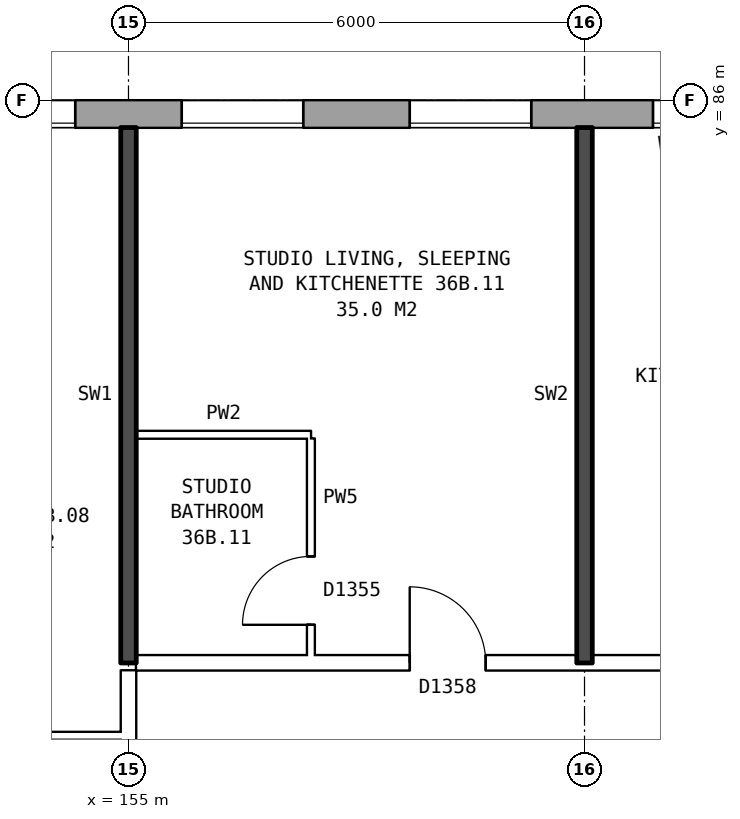
"""IFC4 building model, lengths in metres.
Left out: names, types, materials, properties, quantities, classifications, styles, units other than length and angle.
Written with IfcOpenShell. Run it as: python <this file> out.ifc"""

import sys

from ifc_helpers import new_model, si_unit, direction, frame, frame_2d, origin, place, context, subcontext, project, spatial, rectangle, extrude, element, fill, save


model = new_model("IFC4")
c1 = context("Model", 3, precision=1e-05, world=origin(), true_north=direction((0.0, 1.0)))
c2 = subcontext(c1, "Body", "Model", "MODEL_VIEW")
j1 = project(units=[si_unit("LENGTHUNIT", "METRE"), si_unit("PLANEANGLEUNIT", "RADIAN")], contexts=[c1])
p1 = place(None, origin())
s1 = spatial("IfcSite", under=j1, at=p1, CompositionType="ELEMENT")
p2 = place(p1, origin())
s2 = spatial("IfcBuilding", under=s1, at=p2, CompositionType="ELEMENT")
p3 = place(p2, frame((0.0, 0.0, 129.9)))
s3 = spatial("IfcBuildingStorey", under=s2, at=p3, CompositionType="ELEMENT", Elevation=129.9)
p4 = place(p3, frame((169.675, 85.82, 0.0), z_axis=(0.0, 0.0, 1.0), x_axis=(-1.0, 0.0, 0.0)))
e1 = element("IfcWall", 1, at=p4, inside=s3, PredefinedType="STANDARD", context=c2, shape_type="SweptSolid", body=[
    extrude(rectangle(XDim=35.601, YDim=0.36, at=frame_2d((17.8, 0.0))), origin(), (0.0, 0.0, 1.0), 2.85),
])
p5 = place(p4, frame((0.375, 0.0, 0.8)))
e2 = element("IfcOpeningElement", 2, at=p5, cuts=e1, PredefinedType="OPENING", context=c2, shape_type="SweptSolid", body=[
    extrude(rectangle(XDim=1.6, YDim=1.8, at=frame_2d((0.8, 0.9))), frame((0.0, 0.19, 0.0), z_axis=(0.0, -1.0, 0.0), x_axis=(1.0, 0.0, 0.0)), (0.0, 0.0, 1.0), 0.38),
])
p6 = place(p4, frame((3.375, 0.0, 0.8)))
e3 = element("IfcOpeningElement", 3, at=p6, cuts=e1, PredefinedType="OPENING", context=c2, shape_type="SweptSolid", body=[
    extrude(rectangle(XDim=1.6, YDim=1.8, at=frame_2d((0.8, 0.9))), frame((0.0, 0.19, 0.0), z_axis=(0.0, -1.0, 0.0), x_axis=(1.0, 0.0, 0.0)), (0.0, 0.0, 1.0), 0.38),
])
p7 = place(p4, frame((5.275, 0.0, 0.8)))
e4 = element("IfcOpeningElement", 4, at=p7, cuts=e1, PredefinedType="OPENING", context=c2, shape_type="SweptSolid", body=[
    extrude(rectangle(XDim=1.6, YDim=1.8, at=frame_2d((0.8, 0.9))), frame((0.0, 0.19, 0.0), z_axis=(0.0, -1.0, 0.0), x_axis=(1.0, 0.0, 0.0)), (0.0, 0.0, 1.0), 0.38),
])
p8 = place(p4, frame((9.375, 0.0, 0.8)))
e5 = element("IfcOpeningElement", 5, at=p8, cuts=e1, PredefinedType="OPENING", context=c2, shape_type="SweptSolid", body=[
    extrude(rectangle(XDim=1.6, YDim=1.8, at=frame_2d((0.8, 0.9))), frame((0.0, 0.19, 0.0), z_axis=(0.0, -1.0, 0.0), x_axis=(1.0, 0.0, 0.0)), (0.0, 0.0, 1.0), 0.38),
])
p9 = place(p4, frame((12.375, 0.0, 0.8)))
e6 = element("IfcOpeningElement", 6, at=p9, cuts=e1, PredefinedType="OPENING", context=c2, shape_type="SweptSolid", body=[
    extrude(rectangle(XDim=1.6, YDim=1.8, at=frame_2d((0.8, 0.9))), frame((0.0, 0.19, 0.0), z_axis=(0.0, -1.0, 0.0), x_axis=(1.0, 0.0, 0.0)), (0.0, 0.0, 1.0), 0.38),
])
p10 = place(p4, frame((15.375, 0.0, 0.8)))
e7 = element("IfcOpeningElement", 7, at=p10, cuts=e1, PredefinedType="OPENING", context=c2, shape_type="SweptSolid", body=[
    extrude(rectangle(XDim=1.6, YDim=1.8, at=frame_2d((0.8, 0.9))), frame((0.0, 0.19, 0.0), z_axis=(0.0, -1.0, 0.0), x_axis=(1.0, 0.0, 0.0)), (0.0, 0.0, 1.0), 0.38),
])
p11 = place(p4, frame((18.375, 0.0, 0.8)))
e8 = element("IfcOpeningElement", 8, at=p11, cuts=e1, PredefinedType="OPENING", context=c2, shape_type="SweptSolid", body=[
    extrude(rectangle(XDim=1.6, YDim=1.8, at=frame_2d((0.8, 0.9))), frame((0.0, 0.19, 0.0), z_axis=(0.0, -1.0, 0.0), x_axis=(1.0, 0.0, 0.0)), (0.0, 0.0, 1.0), 0.38),
])
p12 = place(p4, frame((21.375, 0.0, 0.8)))
e9 = element("IfcOpeningElement", 9, at=p12, cuts=e1, PredefinedType="OPENING", context=c2, shape_type="SweptSolid", body=[
    extrude(rectangle(XDim=1.6, YDim=1.8, at=frame_2d((0.8, 0.9))), frame((0.0, 0.19, 0.0), z_axis=(0.0, -1.0, 0.0), x_axis=(1.0, 0.0, 0.0)), (0.0, 0.0, 1.0), 0.38),
])
p13 = place(p4, frame((24.375, 0.0, 0.8)))
e10 = element("IfcOpeningElement", 10, at=p13, cuts=e1, PredefinedType="OPENING", context=c2, shape_type="SweptSolid", body=[
    extrude(rectangle(XDim=1.6, YDim=1.8, at=frame_2d((0.8, 0.9))), frame((0.0, 0.19, 0.0), z_axis=(0.0, -1.0, 0.0), x_axis=(1.0, 0.0, 0.0)), (0.0, 0.0, 1.0), 0.38),
])
p14 = place(p4, frame((27.825, 0.0, 1.7)))
e11 = element("IfcOpeningElement", 11, at=p14, cuts=e1, PredefinedType="OPENING", context=c2, shape_type="SweptSolid", body=[
    extrude(rectangle(XDim=0.6, YDim=0.9, at=frame_2d((0.3, 0.45))), frame((0.0, 0.19, 0.0), z_axis=(0.0, -1.0, 0.0), x_axis=(1.0, 0.0, 0.0)), (0.0, 0.0, 1.0), 0.38),
])
p15 = place(p4, frame((30.375, 0.0, 0.8)))
e12 = element("IfcOpeningElement", 12, at=p15, cuts=e1, PredefinedType="OPENING", context=c2, shape_type="SweptSolid", body=[
    extrude(rectangle(XDim=1.6, YDim=1.8, at=frame_2d((0.8, 0.9))), frame((0.0, 0.19, 0.0), z_axis=(0.0, -1.0, 0.0), x_axis=(1.0, 0.0, 0.0)), (0.0, 0.0, 1.0), 0.38),
])
p16 = place(p4, frame((33.375, 0.0, 0.8)))
e13 = element("IfcOpeningElement", 13, at=p16, cuts=e1, PredefinedType="OPENING", context=c2, shape_type="SweptSolid", body=[
    extrude(rectangle(XDim=1.6, YDim=1.8, at=frame_2d((0.8, 0.9))), frame((0.0, 0.19, 0.0), z_axis=(0.0, -1.0, 0.0), x_axis=(1.0, 0.0, 0.0)), (0.0, 0.0, 1.0), 0.38),
])
p17 = place(p4, frame((7.175, 0.0, 1.7)))
e14 = element("IfcOpeningElement", 14, at=p17, cuts=e1, PredefinedType="OPENING", context=c2, shape_type="SweptSolid", body=[
    extrude(rectangle(XDim=0.6, YDim=0.9, at=frame_2d((0.3, 0.45))), frame((0.0, 0.19, 0.0), z_axis=(0.0, -1.0, 0.0), x_axis=(1.0, 0.0, 0.0)), (0.0, 0.0, 1.0), 0.38),
])
p18 = place(p4, frame((28.725, 0.0, 0.8)))
e15 = element("IfcOpeningElement", 15, at=p18, cuts=e1, PredefinedType="OPENING", context=c2, shape_type="SweptSolid", body=[
    extrude(rectangle(XDim=1.2, YDim=1.8, at=frame_2d((0.6, 0.9))), frame((0.0, 0.19, 0.0), z_axis=(0.0, -1.0, 0.0), x_axis=(1.0, 0.0, 0.0)), (0.0, 0.0, 1.0), 0.38),
])
p19 = place(p3, frame((152.0, 77.64, 0.0), z_axis=(0.0, 0.0, 1.0), x_axis=(1.0, 0.0, 0.0)))
e16 = element("IfcWall", 16, at=p19, inside=s3, PredefinedType="PARTITIONING", context=c2, shape_type="SweptSolid", body=[
    extrude(rectangle(XDim=2.9, YDim=0.1, at=frame_2d((1.45, 0.0))), origin(), (0.0, 0.0, 1.0), 2.85),
])
p20 = place(p19, frame((1.0, 0.0, 0.0)))
e17 = element("IfcOpeningElement", 17, at=p20, cuts=e16, PredefinedType="OPENING", context=c2, shape_type="SweptSolid", body=[
    extrude(rectangle(XDim=0.9, YDim=2.1, at=frame_2d((0.45, 1.05))), frame((0.0, 0.06, 0.0), z_axis=(0.0, -1.0, 0.0), x_axis=(1.0, 0.0, 0.0)), (0.0, 0.0, 1.0), 0.12),
])
p21 = place(p3, frame((155.1, 78.6, 0.0), z_axis=(0.0, 0.0, 1.0), x_axis=(1.0, 0.0, 0.0)))
e18 = element("IfcWall", 18, at=p21, inside=s3, PredefinedType="PARTITIONING", context=c2, shape_type="SweptSolid", body=[
    extrude(rectangle(XDim=17.29, YDim=0.2, at=frame_2d((8.645, 0.0))), origin(), (0.0, 0.0, 1.0), 2.85),
])
p22 = place(p21, frame((3.6, 0.0, 0.0)))
e19 = element("IfcOpeningElement", 19, at=p22, cuts=e18, PredefinedType="OPENING", context=c2, shape_type="SweptSolid", body=[
    extrude(rectangle(XDim=1.0, YDim=2.1, at=frame_2d((0.5, 1.05))), frame((0.0, 0.11, 0.0), z_axis=(0.0, -1.0, 0.0), x_axis=(1.0, 0.0, 0.0)), (0.0, 0.0, 1.0), 0.22),
])
p23 = place(p21, frame((8.4, 0.0, 0.0)))
e20 = element("IfcOpeningElement", 20, at=p23, cuts=e18, PredefinedType="OPENING", context=c2, shape_type="SweptSolid", body=[
    extrude(rectangle(XDim=1.0, YDim=2.1, at=frame_2d((0.5, 1.05))), frame((0.0, 0.11, 0.0), z_axis=(0.0, -1.0, 0.0), x_axis=(1.0, 0.0, 0.0)), (0.0, 0.0, 1.0), 0.22),
])
p24 = place(p3, frame((155.1, 81.6, 0.0), z_axis=(0.0, 0.0, 1.0), x_axis=(1.0, 0.0, 0.0)))
e21 = element("IfcWall", 21, at=p24, inside=s3, PredefinedType="PARTITIONING", context=c2, shape_type="SweptSolid", body=[
    extrude(rectangle(XDim=2.3, YDim=0.1, at=frame_2d((1.15, 0.0))), origin(), (0.0, 0.0, 1.0), 2.85),
])
p25 = place(p3, frame((155.0, 76.3, 0.0), z_axis=(0.0, 0.0, 1.0), x_axis=(0.0, 1.0, 0.0)))
e22 = element("IfcWall", 22, at=p25, inside=s3, PredefinedType="PARTITIONING", context=c2, shape_type="SweptSolid", body=[
    extrude(rectangle(XDim=2.2, YDim=0.2, at=frame_2d((1.1, 0.0))), origin(), (0.0, 0.0, 1.0), 2.85),
])
p26 = place(p3, frame((155.0, 78.6, 0.0), z_axis=(0.0, 0.0, 1.0), x_axis=(0.0, 1.0, 0.0)))
e23 = element("IfcWall", 23, at=p26, inside=s3, PredefinedType="SOLIDWALL", context=c2, shape_type="SweptSolid", body=[
    extrude(rectangle(XDim=7.04, YDim=0.2, at=frame_2d((3.52, 0.0))), origin(), (0.0, 0.0, 1.0), 2.85),
])
p27 = place(p3, frame((157.4, 78.7, 0.0), z_axis=(0.0, 0.0, 1.0), x_axis=(0.0, 1.0, 0.0)))
e24 = element("IfcWall", 24, at=p27, inside=s3, PredefinedType="PARTITIONING", context=c2, shape_type="SweptSolid", body=[
    extrude(rectangle(XDim=2.85, YDim=0.1, at=frame_2d((1.425, 0.0))), origin(), (0.0, 0.0, 1.0), 2.85),
])
p28 = place(p27, frame((0.4, 0.0, 0.0)))
e25 = element("IfcOpeningElement", 25, at=p28, cuts=e24, PredefinedType="OPENING", context=c2, shape_type="SweptSolid", body=[
    extrude(rectangle(XDim=0.9, YDim=2.1, at=frame_2d((0.45, 1.05))), frame((0.0, 0.06, 0.0), z_axis=(0.0, -1.0, 0.0), x_axis=(1.0, 0.0, 0.0)), (0.0, 0.0, 1.0), 0.12),
])
p29 = place(p3, frame((161.0, 78.6, 0.0), z_axis=(0.0, 0.0, 1.0), x_axis=(0.0, 1.0, 0.0)))
e26 = element("IfcWall", 26, at=p29, inside=s3, PredefinedType="SOLIDWALL", context=c2, shape_type="SweptSolid", body=[
    extrude(rectangle(XDim=7.04, YDim=0.2, at=frame_2d((3.52, 0.0))), origin(), (0.0, 0.0, 1.0), 2.85),
])
p30 = place(p8, origin())
e27 = element("IfcWindow", 27, at=p30, inside=s3, PartitioningType="SINGLE_PANEL", PredefinedType="WINDOW", context=c2, shape_type="SweptSolid", body=[
    extrude(rectangle(XDim=1.6, YDim=1.8, at=frame_2d((0.8, 0.9))), frame((0.0, 0.15, 0.0), z_axis=(0.0, -1.0, 0.0), x_axis=(1.0, 0.0, 0.0)), (0.0, 0.0, 1.0), 0.06),
])
fill(e5, e27)
p31 = place(p9, origin())
e28 = element("IfcWindow", 28, at=p31, inside=s3, PartitioningType="SINGLE_PANEL", PredefinedType="WINDOW", context=c2, shape_type="SweptSolid", body=[
    extrude(rectangle(XDim=1.6, YDim=1.8, at=frame_2d((0.8, 0.9))), frame((0.0, 0.15, 0.0), z_axis=(0.0, -1.0, 0.0), x_axis=(1.0, 0.0, 0.0)), (0.0, 0.0, 1.0), 0.06),
])
fill(e6, e28)
p32 = place(p10, origin())
e29 = element("IfcWindow", 29, at=p32, inside=s3, PartitioningType="SINGLE_PANEL", PredefinedType="WINDOW", context=c2, shape_type="SweptSolid", body=[
    extrude(rectangle(XDim=1.6, YDim=1.8, at=frame_2d((0.8, 0.9))), frame((0.0, 0.15, 0.0), z_axis=(0.0, -1.0, 0.0), x_axis=(1.0, 0.0, 0.0)), (0.0, 0.0, 1.0), 0.06),
])
fill(e7, e29)
p33 = place(p22, origin())
e30 = element("IfcDoor", 30, at=p33, inside=s3, OperationType="SINGLE_SWING_LEFT", PredefinedType="DOOR", context=c2, shape_type="SweptSolid", body=[
    extrude(rectangle(XDim=1.0, YDim=2.1, at=frame_2d((0.5, 1.05))), frame((0.0, 0.025, 0.0), z_axis=(0.0, -1.0, 0.0), x_axis=(1.0, 0.0, 0.0)), (0.0, 0.0, 1.0), 0.05),
])
fill(e19, e30)
p34 = place(p28, origin())
e31 = element("IfcDoor", 31, at=p34, inside=s3, OperationType="SINGLE_SWING_LEFT", PredefinedType="DOOR", context=c2, shape_type="SweptSolid", body=[
    extrude(rectangle(XDim=0.9, YDim=2.1, at=frame_2d((0.45, 1.05))), frame((0.0, 0.025, 0.0), z_axis=(0.0, -1.0, 0.0), x_axis=(1.0, 0.0, 0.0)), (0.0, 0.0, 1.0), 0.05),
])
fill(e25, e31)
p35 = place(p17, origin())
e32 = element("IfcWindow", 32, at=p35, inside=s3, PartitioningType="SINGLE_PANEL", PredefinedType="WINDOW", context=c2, shape_type="SweptSolid", body=[
    extrude(rectangle(XDim=0.6, YDim=0.9, at=frame_2d((0.3, 0.45))), frame((0.0, 0.15, 0.0), z_axis=(0.0, -1.0, 0.0), x_axis=(1.0, 0.0, 0.0)), (0.0, 0.0, 1.0), 0.06),
])
fill(e14, e32)
save(model, sys.argv[1])
